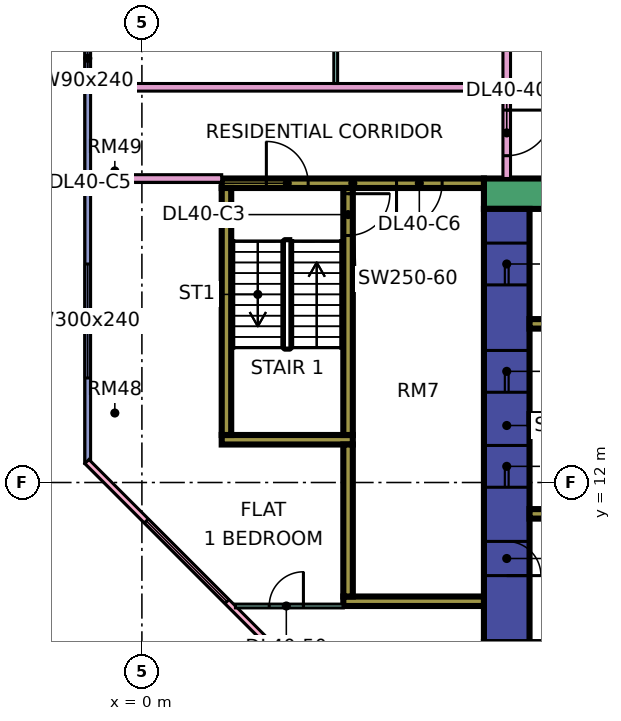
"""IFC4 building model, lengths in metres.
Left out: names, types, materials, properties, quantities, classifications, styles, units other than length and angle.
Written with IfcOpenShell. Run it as: python <this file> out.ifc"""

import sys

from ifc_helpers import new_model, si_unit, direction, frame, frame_2d, origin, place, context, subcontext, project, spatial, rectangle, extrude, element, fill, save


model = new_model("IFC4")
c1 = context("Model", 3, precision=1e-05, world=origin(), true_north=direction((0.0, 1.0)))
c2 = subcontext(c1, "Body", "Model", "MODEL_VIEW")
j1 = project(units=[si_unit("LENGTHUNIT", "METRE"), si_unit("PLANEANGLEUNIT", "RADIAN")], contexts=[c1])
p1 = place(None, origin())
s1 = spatial("IfcSite", under=j1, at=p1, CompositionType="ELEMENT")
p2 = place(p1, origin())
s2 = spatial("IfcBuilding", under=s1, at=p2, CompositionType="ELEMENT")
p3 = place(p2, frame((0.0, 0.0, 176.15)))
s3 = spatial("IfcBuildingStorey", under=s2, at=p3, CompositionType="ELEMENT", Elevation=176.15)
p4 = place(p3, frame((9.0, 19.6, 0.0), z_axis=(0.0, 0.0, 1.0), x_axis=(1.0, 0.0, 0.0)))
e1 = element("IfcWall", 1, at=p4, inside=s3, PredefinedType="SHEAR", context=c2, shape_type="SweptSolid", body=[
    extrude(rectangle(XDim=25.0, YDim=0.8, at=frame_2d((12.5, 0.0))), origin(), (0.0, 0.0, 1.0), 3.75),
])
p5 = place(p4, frame((19.1, 0.0, 0.0)))
e2 = element("IfcOpeningElement", 2, at=p5, cuts=e1, PredefinedType="OPENING", context=c2, shape_type="SweptSolid", body=[
    extrude(rectangle(XDim=1.8, YDim=2.4, at=frame_2d((0.9, 1.2))), frame((0.0, 0.41, 0.0), z_axis=(0.0, -1.0, 0.0), x_axis=(1.0, 0.0, 0.0)), (0.0, 0.0, 1.0), 0.82),
])
p6 = place(p3, frame((9.6, 7.8, 0.0), z_axis=(0.0, 0.0, 1.0), x_axis=(0.0, 1.0, 0.0)))
e3 = element("IfcWall", 3, at=p6, inside=s3, PredefinedType="SHEAR", context=c2, shape_type="SweptSolid", body=[
    extrude(rectangle(XDim=11.4, YDim=1.2, at=frame_2d((5.7, 0.0))), origin(), (0.0, 0.0, 1.0), 3.75),
])
p7 = place(p6, frame((4.075, 0.0, 0.0)))
e4 = element("IfcOpeningElement", 4, at=p7, cuts=e3, PredefinedType="OPENING", context=c2, shape_type="SweptSolid", body=[
    extrude(rectangle(XDim=1.1, YDim=2.2, at=frame_2d((0.55, 1.1))), frame((0.0, 0.61, 0.0), z_axis=(0.0, -1.0, 0.0), x_axis=(1.0, 0.0, 0.0)), (0.0, 0.0, 1.0), 1.22),
])
p8 = place(p6, frame((6.575, 0.0, 0.0)))
e5 = element("IfcOpeningElement", 5, at=p8, cuts=e3, PredefinedType="OPENING", context=c2, shape_type="SweptSolid", body=[
    extrude(rectangle(XDim=1.1, YDim=2.2, at=frame_2d((0.55, 1.1))), frame((0.0, 0.61, 0.0), z_axis=(0.0, -1.0, 0.0), x_axis=(1.0, 0.0, 0.0)), (0.0, 0.0, 1.0), 1.22),
])
p9 = place(p6, frame((9.4, 0.0, 0.0)))
e6 = element("IfcOpeningElement", 6, at=p9, cuts=e3, PredefinedType="OPENING", context=c2, shape_type="SweptSolid", body=[
    extrude(rectangle(XDim=1.1, YDim=2.2, at=frame_2d((0.55, 1.1))), frame((0.0, 0.61, 0.0), z_axis=(0.0, -1.0, 0.0), x_axis=(1.0, 0.0, 0.0)), (0.0, 0.0, 1.0), 1.22),
])
p10 = place(p6, frame((1.75, 0.0, 0.0)))
e7 = element("IfcOpeningElement", 7, at=p10, cuts=e3, PredefinedType="OPENING", context=c2, shape_type="SweptSolid", body=[
    extrude(rectangle(XDim=0.9, YDim=2.1, at=frame_2d((0.45, 1.05))), frame((0.0, 0.61, 0.0), z_axis=(0.0, -1.0, 0.0), x_axis=(1.0, 0.0, 0.0)), (0.0, 0.0, 1.0), 1.22),
])
for number, where, z_axis, x_axis in (
    (8, (10.2, 11.175, 0.0), (0.0, 0.0, 1.0), (1.0, 0.0, 0.0)),
    (9, (10.2, 13.675, 0.0), (0.0, 0.0, 1.0), (1.0, 0.0, 0.0)),
    (10, (10.2, 16.175, 0.0), (0.0, 0.0, 1.0), (1.0, 0.0, 0.0)),
):
    element("IfcWall", number, at=place(p3, frame(where, z_axis=z_axis, x_axis=x_axis)), inside=s3, PredefinedType="SHEAR", context=c2, shape_type="SweptSolid", body=[
        extrude(rectangle(XDim=3.0, YDim=0.25, at=frame_2d((1.5, 0.0))), origin(), (0.0, 0.0, 1.0), 3.75),
    ])
p11 = place(p3, frame((2.1, 19.875, 0.0), z_axis=(0.0, 0.0, 1.0), x_axis=(1.0, 0.0, 0.0)))
e11 = element("IfcWall", 11, at=p11, inside=s3, PredefinedType="SHEAR", context=c2, shape_type="SweptSolid", body=[
    extrude(rectangle(XDim=6.9, YDim=0.25, at=frame_2d((3.45, 0.0))), origin(), (0.0, 0.0, 1.0), 3.75),
])
p12 = place(p11, frame((1.175, 0.0, 0.0)))
e12 = element("IfcOpeningElement", 12, at=p12, cuts=e11, PredefinedType="OPENING", context=c2, shape_type="SweptSolid", body=[
    extrude(rectangle(XDim=1.1, YDim=2.2, at=frame_2d((0.55, 1.1))), frame((0.0, 0.135, 0.0), z_axis=(0.0, -1.0, 0.0), x_axis=(1.0, 0.0, 0.0)), (0.0, 0.0, 1.0), 0.27),
])
p13 = place(p11, frame((4.6, 0.0, 0.0)))
e13 = element("IfcOpeningElement", 13, at=p13, cuts=e11, PredefinedType="OPENING", context=c2, shape_type="SweptSolid", body=[
    extrude(rectangle(XDim=1.2, YDim=2.2, at=frame_2d((0.6, 1.1))), frame((0.0, 0.135, 0.0), z_axis=(0.0, -1.0, 0.0), x_axis=(1.0, 0.0, 0.0)), (0.0, 0.0, 1.0), 0.27),
])
p14 = place(p3, frame((2.1, 13.125, 0.0), z_axis=(0.0, 0.0, 1.0), x_axis=(1.0, 0.0, 0.0)))
e14 = element("IfcWall", 14, at=p14, inside=s3, PredefinedType="SHEAR", context=c2, shape_type="SweptSolid", body=[
    extrude(rectangle(XDim=3.45, YDim=0.25, at=frame_2d((1.725, 0.0))), origin(), (0.0, 0.0, 1.0), 3.75),
])
p15 = place(p3, frame((2.225, 13.25, 0.0), z_axis=(0.0, 0.0, 1.0), x_axis=(0.0, 1.0, 0.0)))
e15 = element("IfcWall", 15, at=p15, inside=s3, PredefinedType="SHEAR", context=c2, shape_type="SweptSolid", body=[
    extrude(rectangle(XDim=6.5, YDim=0.25, at=frame_2d((3.25, 0.0))), origin(), (0.0, 0.0, 1.0), 3.75),
])
p16 = place(p3, frame((5.425, 13.25, 0.0), z_axis=(0.0, 0.0, 1.0), x_axis=(0.0, 1.0, 0.0)))
e16 = element("IfcWall", 16, at=p16, inside=s3, PredefinedType="SHEAR", context=c2, shape_type="SweptSolid", body=[
    extrude(rectangle(XDim=6.5, YDim=0.25, at=frame_2d((3.25, 0.0))), origin(), (0.0, 0.0, 1.0), 3.75),
])
p17 = place(p16, frame((5.25, 0.0, 0.0)))
e17 = element("IfcOpeningElement", 17, at=p17, cuts=e16, PredefinedType="OPENING", context=c2, shape_type="SweptSolid", body=[
    extrude(rectangle(XDim=1.1, YDim=2.2, at=frame_2d((0.55, 1.1))), frame((0.0, 0.135, 0.0), z_axis=(0.0, -1.0, 0.0), x_axis=(1.0, 0.0, 0.0)), (0.0, 0.0, 1.0), 0.27),
])
p18 = place(p3, frame((5.3, 8.875, 0.0), z_axis=(0.0, 0.0, 1.0), x_axis=(1.0, 0.0, 0.0)))
e18 = element("IfcWall", 18, at=p18, inside=s3, PredefinedType="SHEAR", context=c2, shape_type="SweptSolid", body=[
    extrude(rectangle(XDim=3.7, YDim=0.25, at=frame_2d((1.85, 0.0))), origin(), (0.0, 0.0, 1.0), 3.75),
])
p19 = place(p3, frame((5.425, 9.0, 0.0), z_axis=(0.0, 0.0, 1.0), x_axis=(0.0, 1.0, 0.0)))
e19 = element("IfcWall", 19, at=p19, inside=s3, PredefinedType="SHEAR", context=c2, shape_type="SweptSolid", body=[
    extrude(rectangle(XDim=4.0, YDim=0.25, at=frame_2d((2.0, 0.0))), origin(), (0.0, 0.0, 1.0), 3.75),
])
p20 = place(p3, frame((-1.425, 23.925, 0.0), z_axis=(0.0, 0.0, 1.0), x_axis=(0.0, -1.0, 0.0)))
e20 = element("IfcWall", 20, at=p20, inside=s3, PredefinedType="SOLIDWALL", context=c2, shape_type="SweptSolid", body=[
    extrude(rectangle(XDim=11.425, YDim=0.15, at=frame_2d((5.712, 0.0))), origin(), (0.0, 0.0, 1.0), 3.35),
])
p21 = place(p20, frame((0.312, 0.0, 0.45)))
e21 = element("IfcOpeningElement", 21, at=p21, cuts=e20, PredefinedType="OPENING", context=c2, shape_type="SweptSolid", body=[
    extrude(rectangle(XDim=0.9, YDim=2.4, at=frame_2d((0.45, 1.2))), frame((0.0, 0.085, 0.0), z_axis=(0.0, -1.0, 0.0), x_axis=(1.0, 0.0, 0.0)), (0.0, 0.0, 1.0), 0.17),
])
p22 = place(p20, frame((6.175, 0.0, 0.45)))
e22 = element("IfcOpeningElement", 22, at=p22, cuts=e20, PredefinedType="OPENING", context=c2, shape_type="SweptSolid", body=[
    extrude(rectangle(XDim=3.0, YDim=2.4, at=frame_2d((1.5, 1.2))), frame((0.0, 0.085, 0.0), z_axis=(0.0, -1.0, 0.0), x_axis=(1.0, 0.0, 0.0)), (0.0, 0.0, 1.0), 0.17),
])
p23 = place(p3, frame((-1.447, 12.553, 0.0), z_axis=(0.0, 0.0, 1.0), x_axis=(0.707106781187, -0.707106781187, 0.0)))
e23 = element("IfcWall", 23, at=p23, inside=s3, PredefinedType="SOLIDWALL", context=c2, shape_type="SweptSolid", body=[
    extrude(rectangle(XDim=19.799, YDim=0.15, at=frame_2d((9.899, 0.0))), origin(), (0.0, 0.0, 1.0), 3.35),
])
p24 = place(p23, frame((2.212, 0.0, 0.45)))
e24 = element("IfcOpeningElement", 24, at=p24, cuts=e23, PredefinedType="OPENING", context=c2, shape_type="SweptSolid", body=[
    extrude(rectangle(XDim=3.0, YDim=2.4, at=frame_2d((1.5, 1.2))), frame((0.0, 0.085, 0.0), z_axis=(0.0, -1.0, 0.0), x_axis=(1.0, 0.0, 0.0)), (0.0, 0.0, 1.0), 0.17),
])
p25 = place(p23, frame((10.216, 0.0, 0.45)))
e25 = element("IfcOpeningElement", 25, at=p25, cuts=e23, PredefinedType="OPENING", context=c2, shape_type="SweptSolid", body=[
    extrude(rectangle(XDim=3.0, YDim=2.4, at=frame_2d((1.5, 1.2))), frame((0.0, 0.085, 0.0), z_axis=(0.0, -1.0, 0.0), x_axis=(1.0, 0.0, 0.0)), (0.0, 0.0, 1.0), 0.17),
])
p26 = place(p3, frame((-1.35, 20.0, 0.0), z_axis=(0.0, 0.0, 1.0), x_axis=(1.0, 0.0, 0.0)))
e26 = element("IfcWall", 26, at=p26, inside=s3, PredefinedType="PARTITIONING", context=c2, shape_type="SweptSolid", body=[
    extrude(rectangle(XDim=3.45, YDim=0.2, at=frame_2d((1.725, 0.0))), origin(), (0.0, 0.0, 1.0), 3.35),
])
p27 = place(p3, frame((-1.35, 22.4, 0.0), z_axis=(0.0, 0.0, 1.0), x_axis=(1.0, 0.0, 0.0)))
e27 = element("IfcWall", 27, at=p27, inside=s3, PredefinedType="PARTITIONING", context=c2, shape_type="SweptSolid", body=[
    extrude(rectangle(XDim=10.85, YDim=0.2, at=frame_2d((5.425, 0.0))), origin(), (0.0, 0.0, 1.0), 3.35),
])
p28 = place(p3, frame((2.461, 8.75, 0.0), z_axis=(0.0, 0.0, 1.0), x_axis=(1.0, 0.0, 0.0)))
e28 = element("IfcWall", 28, at=p28, inside=s3, PredefinedType="PARTITIONING", context=c2, shape_type="SweptSolid", body=[
    extrude(rectangle(XDim=2.839, YDim=0.1, at=frame_2d((1.419, 0.0))), origin(), (0.0, 0.0, 1.0), 3.35),
])
p29 = place(p28, frame((0.889, 0.0, 0.0)))
e29 = element("IfcOpeningElement", 29, at=p29, cuts=e28, PredefinedType="OPENING", context=c2, shape_type="SweptSolid", body=[
    extrude(rectangle(XDim=0.9, YDim=2.1, at=frame_2d((0.45, 1.05))), frame((0.0, 0.06, 0.0), z_axis=(0.0, -1.0, 0.0), x_axis=(1.0, 0.0, 0.0)), (0.0, 0.0, 1.0), 0.12),
])
p30 = place(p3, frame((5.1, 22.5, 0.0), z_axis=(0.0, 0.0, 1.0), x_axis=(0.0, 1.0, 0.0)))
e30 = element("IfcWall", 30, at=p30, inside=s3, PredefinedType="PARTITIONING", context=c2, shape_type="SweptSolid", body=[
    extrude(rectangle(XDim=4.45, YDim=0.1, at=frame_2d((2.225, 0.0))), origin(), (0.0, 0.0, 1.0), 3.35),
])
p31 = place(p3, frame((9.6, 20.0, 0.0), z_axis=(0.0, 0.0, 1.0), x_axis=(0.0, 1.0, 0.0)))
e31 = element("IfcWall", 31, at=p31, inside=s3, PredefinedType="PARTITIONING", context=c2, shape_type="SweptSolid", body=[
    extrude(rectangle(XDim=42.926, YDim=0.2, at=frame_2d((21.463, 0.0))), origin(), (0.0, 0.0, 1.0), 3.35),
])
p32 = place(p31, frame((31.35, 0.0, 0.0)))
e32 = element("IfcOpeningElement", 32, at=p32, cuts=e31, PredefinedType="OPENING", context=c2, shape_type="SweptSolid", body=[
    extrude(rectangle(XDim=1.0, YDim=2.1, at=frame_2d((0.5, 1.05))), frame((0.0, 0.11, 0.0), z_axis=(0.0, -1.0, 0.0), x_axis=(1.0, 0.0, 0.0)), (0.0, 0.0, 1.0), 0.22),
])
p33 = place(p31, frame((0.6, 0.0, 0.0)))
e33 = element("IfcOpeningElement", 33, at=p33, cuts=e31, PredefinedType="OPENING", context=c2, shape_type="SweptSolid", body=[
    extrude(rectangle(XDim=1.2, YDim=2.1, at=frame_2d((0.6, 1.05))), frame((0.0, 0.11, 0.0), z_axis=(0.0, -1.0, 0.0), x_axis=(1.0, 0.0, 0.0)), (0.0, 0.0, 1.0), 0.22),
])
p34 = place(p31, frame((3.9, 0.0, 0.0)))
e34 = element("IfcOpeningElement", 34, at=p34, cuts=e31, PredefinedType="OPENING", context=c2, shape_type="SweptSolid", body=[
    extrude(rectangle(XDim=1.0, YDim=2.1, at=frame_2d((0.5, 1.05))), frame((0.0, 0.11, 0.0), z_axis=(0.0, -1.0, 0.0), x_axis=(1.0, 0.0, 0.0)), (0.0, 0.0, 1.0), 0.22),
])
p35 = place(p21, origin())
e35 = element("IfcWindow", 35, at=p35, inside=s3, PartitioningType="SINGLE_PANEL", PredefinedType="WINDOW", context=c2, shape_type="SweptSolid", body=[
    extrude(rectangle(XDim=0.9, YDim=2.4, at=frame_2d((0.45, 1.2))), frame((0.0, 0.03, 0.0), z_axis=(0.0, -1.0, 0.0), x_axis=(1.0, 0.0, 0.0)), (0.0, 0.0, 1.0), 0.06),
])
fill(e21, e35)
p36 = place(p22, origin())
e36 = element("IfcWindow", 36, at=p36, inside=s3, PartitioningType="SINGLE_PANEL", PredefinedType="WINDOW", context=c2, shape_type="SweptSolid", body=[
    extrude(rectangle(XDim=3.0, YDim=2.4, at=frame_2d((1.5, 1.2))), frame((0.0, 0.03, 0.0), z_axis=(0.0, -1.0, 0.0), x_axis=(1.0, 0.0, 0.0)), (0.0, 0.0, 1.0), 0.06),
])
fill(e22, e36)
p37 = place(p24, origin())
e37 = element("IfcWindow", 37, at=p37, inside=s3, PartitioningType="SINGLE_PANEL", PredefinedType="WINDOW", context=c2, shape_type="SweptSolid", body=[
    extrude(rectangle(XDim=3.0, YDim=2.4, at=frame_2d((1.5, 1.2))), frame((0.0, 0.03, 0.0), z_axis=(0.0, -1.0, 0.0), x_axis=(1.0, 0.0, 0.0)), (0.0, 0.0, 1.0), 0.06),
])
fill(e24, e37)
p38 = place(p7, origin())
e38 = element("IfcDoor", 38, at=p38, inside=s3, OperationType="DOUBLE_DOOR_SLIDING", PredefinedType="DOOR", context=c2, shape_type="SweptSolid", body=[
    extrude(rectangle(XDim=1.1, YDim=2.2, at=frame_2d((0.55, 1.1))), frame((0.0, 0.025, 0.0), z_axis=(0.0, -1.0, 0.0), x_axis=(1.0, 0.0, 0.0)), (0.0, 0.0, 1.0), 0.05),
])
fill(e4, e38)
p39 = place(p8, origin())
e39 = element("IfcDoor", 39, at=p39, inside=s3, OperationType="DOUBLE_DOOR_SLIDING", PredefinedType="DOOR", context=c2, shape_type="SweptSolid", body=[
    extrude(rectangle(XDim=1.1, YDim=2.2, at=frame_2d((0.55, 1.1))), frame((0.0, 0.025, 0.0), z_axis=(0.0, -1.0, 0.0), x_axis=(1.0, 0.0, 0.0)), (0.0, 0.0, 1.0), 0.05),
])
fill(e5, e39)
p40 = place(p9, origin())
e40 = element("IfcDoor", 40, at=p40, inside=s3, OperationType="DOUBLE_DOOR_SLIDING", PredefinedType="DOOR", context=c2, shape_type="SweptSolid", body=[
    extrude(rectangle(XDim=1.1, YDim=2.2, at=frame_2d((0.55, 1.1))), frame((0.0, 0.025, 0.0), z_axis=(0.0, -1.0, 0.0), x_axis=(1.0, 0.0, 0.0)), (0.0, 0.0, 1.0), 0.05),
])
fill(e6, e40)
p41 = place(p17, origin())
e41 = element("IfcDoor", 41, at=p41, inside=s3, OperationType="SINGLE_SWING_RIGHT", PredefinedType="DOOR", context=c2, shape_type="SweptSolid", body=[
    extrude(rectangle(XDim=1.1, YDim=2.2, at=frame_2d((0.55, 1.1))), frame((0.0, 0.025, 0.0), z_axis=(0.0, -1.0, 0.0), x_axis=(1.0, 0.0, 0.0)), (0.0, 0.0, 1.0), 0.05),
])
fill(e17, e41)
p42 = place(p10, frame((0.9, 0.0, 0.0), z_axis=(0.0, 0.0, 1.0), x_axis=(-1.0, 0.0, 0.0)))
e42 = element("IfcDoor", 42, at=p42, inside=s3, OperationType="SINGLE_SWING_LEFT", PredefinedType="DOOR", context=c2, shape_type="SweptSolid", body=[
    extrude(rectangle(XDim=0.9, YDim=2.1, at=frame_2d((0.45, 1.05))), frame((0.0, 0.025, 0.0), z_axis=(0.0, -1.0, 0.0), x_axis=(1.0, 0.0, 0.0)), (0.0, 0.0, 1.0), 0.05),
])
fill(e7, e42)
p43 = place(p12, origin())
e43 = element("IfcDoor", 43, at=p43, inside=s3, OperationType="SINGLE_SWING_LEFT", PredefinedType="DOOR", context=c2, shape_type="SweptSolid", body=[
    extrude(rectangle(XDim=1.1, YDim=2.2, at=frame_2d((0.55, 1.1))), frame((0.0, 0.025, 0.0), z_axis=(0.0, -1.0, 0.0), x_axis=(1.0, 0.0, 0.0)), (0.0, 0.0, 1.0), 0.05),
])
fill(e12, e43)
p44 = place(p13, frame((1.2, 0.0, 0.0), z_axis=(0.0, 0.0, 1.0), x_axis=(-1.0, 0.0, 0.0)))
e44 = element("IfcDoor", 44, at=p44, inside=s3, OperationType="SINGLE_SWING_LEFT", PredefinedType="DOOR", context=c2, shape_type="SweptSolid", body=[
    extrude(rectangle(XDim=1.2, YDim=2.2, at=frame_2d((0.6, 1.1))), frame((0.0, 0.025, 0.0), z_axis=(0.0, -1.0, 0.0), x_axis=(1.0, 0.0, 0.0)), (0.0, 0.0, 1.0), 0.05),
])
fill(e13, e44)
p45 = place(p33, origin())
e45 = element("IfcDoor", 45, at=p45, inside=s3, OperationType="SINGLE_SWING_RIGHT", PredefinedType="DOOR", context=c2, shape_type="SweptSolid", body=[
    extrude(rectangle(XDim=1.2, YDim=2.1, at=frame_2d((0.6, 1.05))), frame((0.0, 0.025, 0.0), z_axis=(0.0, -1.0, 0.0), x_axis=(1.0, 0.0, 0.0)), (0.0, 0.0, 1.0), 0.05),
])
fill(e33, e45)
p46 = place(p29, frame((0.9, 0.0, 0.0), z_axis=(0.0, 0.0, 1.0), x_axis=(-1.0, 0.0, 0.0)))
e46 = element("IfcDoor", 46, at=p46, inside=s3, OperationType="SINGLE_SWING_RIGHT", PredefinedType="DOOR", context=c2, shape_type="SweptSolid", body=[
    extrude(rectangle(XDim=0.9, YDim=2.1, at=frame_2d((0.45, 1.05))), frame((0.0, 0.025, 0.0), z_axis=(0.0, -1.0, 0.0), x_axis=(1.0, 0.0, 0.0)), (0.0, 0.0, 1.0), 0.05),
])
fill(e29, e46)
save(model, sys.argv[1])
